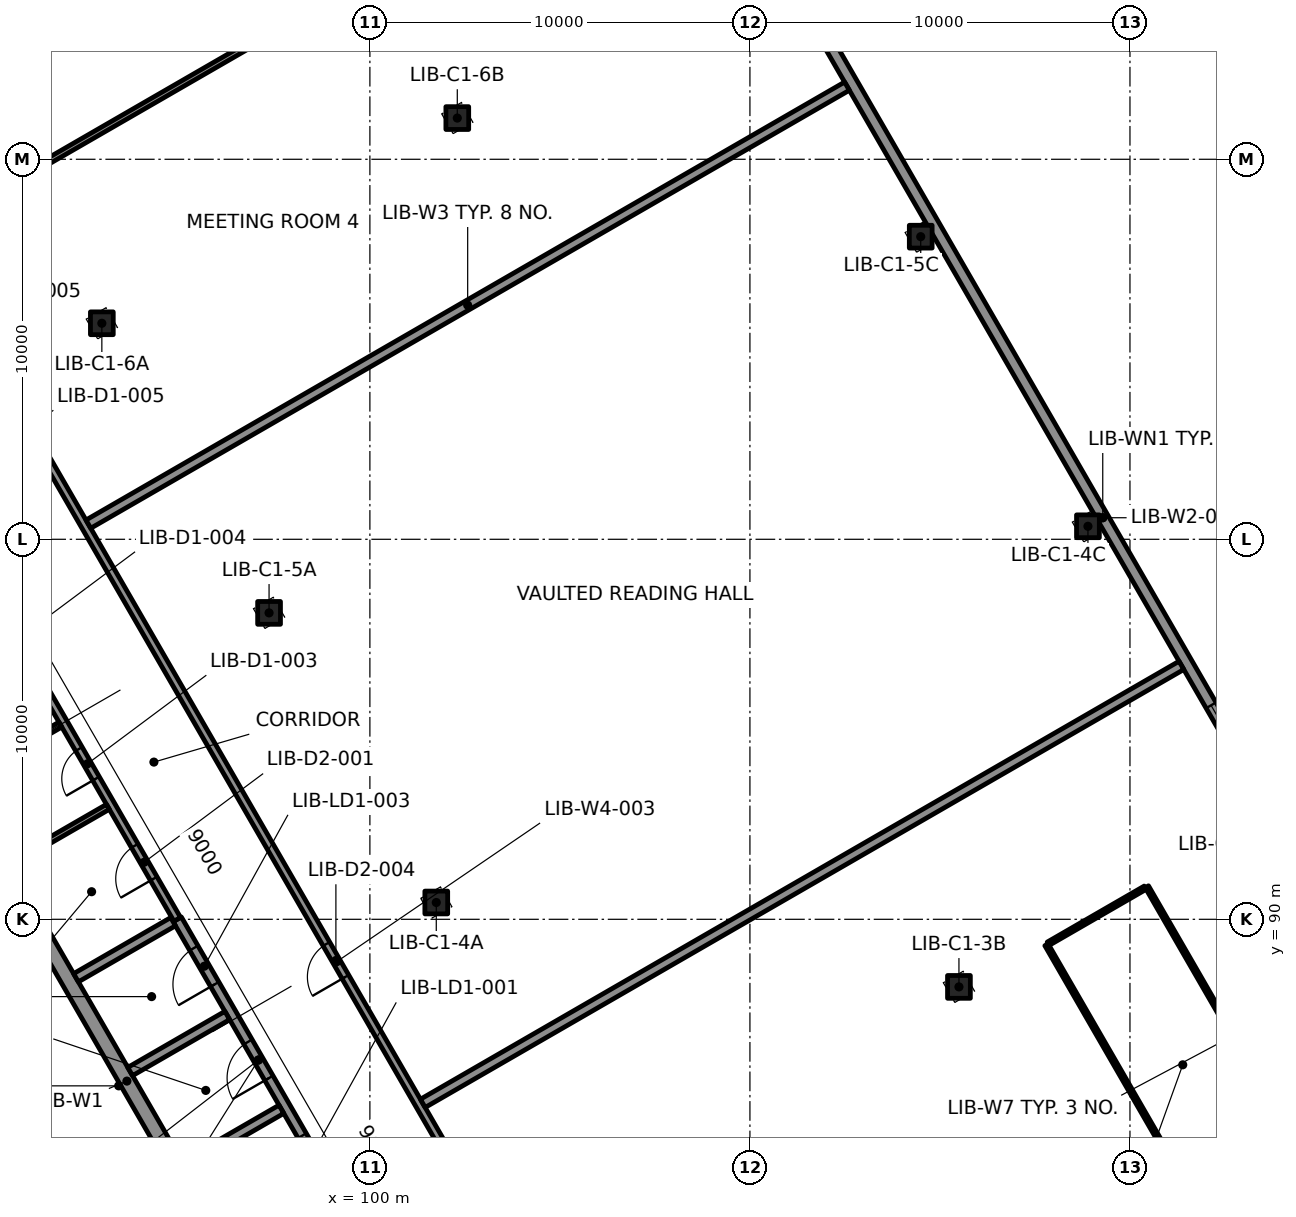
"""IFC4 building model, lengths in metres.
Left out: names, types, materials, properties, quantities, classifications, styles, units other than length and angle.
Written with IfcOpenShell. Run it as: python <this file> out.ifc"""

import sys

from ifc_helpers import new_model, si_unit, direction, frame, frame_2d, origin, origin_2d, place, context, subcontext, project, spatial, rectangle, extrude, element, fill, save


model = new_model("IFC4")
c1 = context("Model", 3, precision=1e-05, world=origin(), true_north=direction((0.0, 1.0)))
c2 = subcontext(c1, "Body", "Model", "MODEL_VIEW")
j1 = project(units=[si_unit("LENGTHUNIT", "METRE"), si_unit("PLANEANGLEUNIT", "RADIAN")], contexts=[c1])
p1 = place(None, origin())
s1 = spatial("IfcSite", under=j1, at=p1, CompositionType="ELEMENT")
p2 = place(p1, origin())
s2 = spatial("IfcBuilding", under=s1, at=p2, CompositionType="ELEMENT")
p3 = place(p2, frame((0.0, 0.0, 21.8)))
s3 = spatial("IfcBuildingStorey", under=s2, at=p3, CompositionType="ELEMENT", Elevation=21.8)
p4 = place(p3, frame((92.22, 84.942, -0.0), z_axis=(0.0, 0.0, 1.0), x_axis=(-0.5, 0.866025403784, 0.0)))
e1 = element("IfcColumn", 1, at=p4, inside=s3, PredefinedType="COLUMN", context=c2, shape_type="SweptSolid", body=[
    extrude(rectangle(XDim=1.2, YDim=1.5, at=origin_2d()), origin(), (0.0, 0.0, 1.0), 4.6),
])
for number, where, z_axis, x_axis in (
    (2, (115.5, 88.221, -0.36), (0.0, 0.0, 1.0), (1.0, 0.0, 0.0)),
    (3, (101.747, 90.442, -0.36), (0.0, 0.0, 1.0), (1.0, 0.0, 0.0)),
    (4, (118.894, 100.342, -0.36), (0.0, 0.0, 1.0), (1.0, 0.0, 0.0)),
    (5, (97.347, 98.063, -0.36), (0.0, 0.0, 1.0), (1.0, 0.0, 0.0)),
    (6, (114.494, 107.963, -0.36), (0.0, 0.0, 1.0), (1.0, 0.0, 0.0)),
    (7, (92.947, 105.684, -0.36), (0.0, 0.0, 1.0), (1.0, 0.0, 0.0)),
    (8, (102.3, 111.084, -0.36), (0.0, 0.0, 1.0), (1.0, 0.0, 0.0)),
):
    element("IfcColumn", number, at=place(p3, frame(where, z_axis=z_axis, x_axis=x_axis)), inside=s3, PredefinedType="COLUMN", context=c2, shape_type="SweptSolid", body=[
        extrude(rectangle(XDim=0.6, YDim=0.6, at=origin_2d()), origin(), (0.0, 0.0, 1.0), 4.66),
    ])
p5 = place(p3, frame((107.106, 62.36, 0.0), z_axis=(0.0, 0.0, 1.0), x_axis=(-0.49999992739, 0.866025445706, 0.0)))
e9 = element("IfcWall", 9, at=p5, inside=s3, PredefinedType="SOLIDWALL", context=c2, shape_type="SweptSolid", body=[
    extrude(rectangle(XDim=54.0, YDim=0.4, at=frame_2d((27.0, 0.0))), origin(), (0.0, 0.0, 1.0), 4.3),
])
p6 = place(p3, frame((132.784, 77.185, 0.0), z_axis=(0.0, 0.0, 1.0), x_axis=(-0.49999992739, 0.866025445706, 0.0)))
e10 = element("IfcWall", 10, at=p6, inside=s3, PredefinedType="SOLIDWALL", context=c2, shape_type="SweptSolid", body=[
    extrude(rectangle(XDim=54.0, YDim=0.3, at=frame_2d((27.0, 0.0))), origin(), (0.0, 0.0, 1.0), 4.3),
])
p7 = place(p6, frame((1.9, 0.0, 0.9)))
e11 = element("IfcOpeningElement", 11, at=p7, cuts=e10, PredefinedType="OPENING", context=c2, shape_type="SweptSolid", body=[
    extrude(rectangle(XDim=1.8, YDim=2.4, at=frame_2d((0.9, 1.2))), frame((0.0, 0.16, 0.0), z_axis=(0.0, -1.0, 0.0), x_axis=(1.0, 0.0, 0.0)), (0.0, 0.0, 1.0), 0.32),
])
p8 = place(p6, frame((6.3, 0.0, 0.9)))
e12 = element("IfcOpeningElement", 12, at=p8, cuts=e10, PredefinedType="OPENING", context=c2, shape_type="SweptSolid", body=[
    extrude(rectangle(XDim=1.8, YDim=2.4, at=frame_2d((0.9, 1.2))), frame((0.0, 0.16, 0.0), z_axis=(0.0, -1.0, 0.0), x_axis=(1.0, 0.0, 0.0)), (0.0, 0.0, 1.0), 0.32),
])
p9 = place(p6, frame((10.7, 0.0, 0.9)))
e13 = element("IfcOpeningElement", 13, at=p9, cuts=e10, PredefinedType="OPENING", context=c2, shape_type="SweptSolid", body=[
    extrude(rectangle(XDim=1.8, YDim=2.4, at=frame_2d((0.9, 1.2))), frame((0.0, 0.16, 0.0), z_axis=(0.0, -1.0, 0.0), x_axis=(1.0, 0.0, 0.0)), (0.0, 0.0, 1.0), 0.32),
])
p10 = place(p6, frame((15.1, 0.0, 0.9)))
e14 = element("IfcOpeningElement", 14, at=p10, cuts=e10, PredefinedType="OPENING", context=c2, shape_type="SweptSolid", body=[
    extrude(rectangle(XDim=1.8, YDim=2.4, at=frame_2d((0.9, 1.2))), frame((0.0, 0.16, 0.0), z_axis=(0.0, -1.0, 0.0), x_axis=(1.0, 0.0, 0.0)), (0.0, 0.0, 1.0), 0.32),
])
p11 = place(p6, frame((19.5, 0.0, 0.9)))
e15 = element("IfcOpeningElement", 15, at=p11, cuts=e10, PredefinedType="OPENING", context=c2, shape_type="SweptSolid", body=[
    extrude(rectangle(XDim=1.8, YDim=2.4, at=frame_2d((0.9, 1.2))), frame((0.0, 0.16, 0.0), z_axis=(0.0, -1.0, 0.0), x_axis=(1.0, 0.0, 0.0)), (0.0, 0.0, 1.0), 0.32),
])
p12 = place(p6, frame((41.5, 0.0, 0.9)))
e16 = element("IfcOpeningElement", 16, at=p12, cuts=e10, PredefinedType="OPENING", context=c2, shape_type="SweptSolid", body=[
    extrude(rectangle(XDim=1.8, YDim=2.4, at=frame_2d((0.9, 1.2))), frame((0.0, 0.16, 0.0), z_axis=(0.0, -1.0, 0.0), x_axis=(1.0, 0.0, 0.0)), (0.0, 0.0, 1.0), 0.32),
])
p13 = place(p6, frame((45.9, 0.0, 0.9)))
e17 = element("IfcOpeningElement", 17, at=p13, cuts=e10, PredefinedType="OPENING", context=c2, shape_type="SweptSolid", body=[
    extrude(rectangle(XDim=1.8, YDim=2.4, at=frame_2d((0.9, 1.2))), frame((0.0, 0.16, 0.0), z_axis=(0.0, -1.0, 0.0), x_axis=(1.0, 0.0, 0.0)), (0.0, 0.0, 1.0), 0.32),
])
p14 = place(p6, frame((50.3, 0.0, 0.9)))
e18 = element("IfcOpeningElement", 18, at=p14, cuts=e10, PredefinedType="OPENING", context=c2, shape_type="SweptSolid", body=[
    extrude(rectangle(XDim=1.8, YDim=2.4, at=frame_2d((0.9, 1.2))), frame((0.0, 0.16, 0.0), z_axis=(0.0, -1.0, 0.0), x_axis=(1.0, 0.0, 0.0)), (0.0, 0.0, 1.0), 0.32),
])
p15 = place(p3, frame((80.354, 109.095, 0.0), z_axis=(0.0, 0.0, 1.0), x_axis=(0.866026568746, 0.499997982221, 0.0)))
e19 = element("IfcWall", 19, at=p15, inside=s3, PredefinedType="SOLIDWALL", context=c2, shape_type="SweptSolid", body=[
    extrude(rectangle(XDim=29.3, YDim=0.3, at=frame_2d((14.65, 0.0))), origin(), (0.0, 0.0, 1.0), 4.3),
])
p16 = place(p3, frame((99.205, 82.595, 0.0), z_axis=(0.0, 0.0, 1.0), x_axis=(-0.500011643316, 0.866018681408, 0.0)))
e20 = element("IfcWall", 20, at=p16, inside=s3, PredefinedType="SOLIDWALL", context=c2, shape_type="SweptSolid", body=[
    extrude(rectangle(XDim=8.55, YDim=0.25, at=frame_2d((4.275, 0.0))), origin(), (0.0, 0.0, 1.0), 4.3),
])
p17 = place(p16, frame((0.875, 0.0, 0.0)))
e21 = element("IfcOpeningElement", 21, at=p17, cuts=e20, PredefinedType="OPENING", context=c2, shape_type="SweptSolid", body=[
    extrude(rectangle(XDim=1.1, YDim=2.1, at=frame_2d((0.55, 1.05))), frame((0.0, 0.135, 0.0), z_axis=(0.0, -1.0, 0.0), x_axis=(1.0, 0.0, 0.0)), (0.0, 0.0, 1.0), 0.27),
])
p18 = place(p16, frame((3.725, 0.0, 0.0)))
e22 = element("IfcOpeningElement", 22, at=p18, cuts=e20, PredefinedType="OPENING", context=c2, shape_type="SweptSolid", body=[
    extrude(rectangle(XDim=1.1, YDim=2.1, at=frame_2d((0.55, 1.05))), frame((0.0, 0.135, 0.0), z_axis=(0.0, -1.0, 0.0), x_axis=(1.0, 0.0, 0.0)), (0.0, 0.0, 1.0), 0.27),
])
p19 = place(p16, frame((6.575, 0.0, 0.0)))
e23 = element("IfcOpeningElement", 23, at=p19, cuts=e20, PredefinedType="OPENING", context=c2, shape_type="SweptSolid", body=[
    extrude(rectangle(XDim=1.1, YDim=2.1, at=frame_2d((0.55, 1.05))), frame((0.0, 0.135, 0.0), z_axis=(0.0, -1.0, 0.0), x_axis=(1.0, 0.0, 0.0)), (0.0, 0.0, 1.0), 0.27),
])
p20 = place(p3, frame((94.93, 90.0, 0.0), z_axis=(0.0, 0.0, 1.0), x_axis=(-0.499997667785, 0.866026750285, 0.0)))
e24 = element("IfcWall", 24, at=p20, inside=s3, PredefinedType="PARTITIONING", context=c2, shape_type="SweptSolid", body=[
    extrude(rectangle(XDim=14.59, YDim=0.2, at=frame_2d((7.295, 0.0))), origin(), (0.0, 0.0, 1.0), 4.3),
])
p21 = place(p20, frame((1.235, 0.0, 0.0)))
e25 = element("IfcOpeningElement", 25, at=p21, cuts=e24, PredefinedType="OPENING", context=c2, shape_type="SweptSolid", body=[
    extrude(rectangle(XDim=1.0, YDim=2.1, at=frame_2d((0.5, 1.05))), frame((0.0, 0.11, 0.0), z_axis=(0.0, -1.0, 0.0), x_axis=(1.0, 0.0, 0.0)), (0.0, 0.0, 1.0), 0.22),
])
p22 = place(p20, frame((4.275, 0.0, 0.0)))
e26 = element("IfcOpeningElement", 26, at=p22, cuts=e24, PredefinedType="OPENING", context=c2, shape_type="SweptSolid", body=[
    extrude(rectangle(XDim=0.9, YDim=2.1, at=frame_2d((0.45, 1.05))), frame((0.0, 0.11, 0.0), z_axis=(0.0, -1.0, 0.0), x_axis=(1.0, 0.0, 0.0)), (0.0, 0.0, 1.0), 0.22),
])
p23 = place(p20, frame((8.025, 0.0, 0.0)))
e27 = element("IfcOpeningElement", 27, at=p23, cuts=e24, PredefinedType="OPENING", context=c2, shape_type="SweptSolid", body=[
    extrude(rectangle(XDim=0.9, YDim=2.1, at=frame_2d((0.45, 1.05))), frame((0.0, 0.11, 0.0), z_axis=(0.0, -1.0, 0.0), x_axis=(1.0, 0.0, 0.0)), (0.0, 0.0, 1.0), 0.22),
])
p24 = place(p20, frame((12.325, 0.0, 0.0)))
e28 = element("IfcOpeningElement", 28, at=p24, cuts=e24, PredefinedType="OPENING", context=c2, shape_type="SweptSolid", body=[
    extrude(rectangle(XDim=0.9, YDim=2.1, at=frame_2d((0.45, 1.05))), frame((0.0, 0.11, 0.0), z_axis=(0.0, -1.0, 0.0), x_axis=(1.0, 0.0, 0.0)), (0.0, 0.0, 1.0), 0.22),
])
for number, where, z_axis, x_axis in (
    (29, (95.117, 83.526, 0.0), (0.0, 0.0, 1.0), (0.866, 0.5, 0.0)),
    (30, (93.692, 85.994, 0.0), (0.0, 0.0, 1.0), (0.866, 0.5, 0.0)),
):
    element("IfcWall", number, at=place(p3, frame(where, z_axis=z_axis, x_axis=x_axis)), inside=s3, PredefinedType="SOLIDWALL", context=c2, shape_type="SweptSolid", body=[
        extrude(rectangle(XDim=2.95, YDim=0.25, at=frame_2d((1.475, 0.0))), origin(), (0.0, 0.0, 1.0), 4.3),
    ])
p25 = place(p3, frame((92.267, 88.462, 0.0), z_axis=(0.0, 0.0, 1.0), x_axis=(0.866024349092, 0.500001826776, 0.0)))
e31 = element("IfcWall", 31, at=p25, inside=s3, PredefinedType="SOLIDWALL", context=c2, shape_type="SweptSolid", body=[
    extrude(rectangle(XDim=2.95, YDim=0.25, at=frame_2d((1.475, 0.0))), origin(), (0.0, 0.0, 1.0), 4.3),
])
for number, where, z_axis, x_axis in (
    (32, (90.529, 91.471, 0.0), (0.0, 0.0, 1.0), (0.866, 0.5, 0.0)),
    (33, (89.279, 93.636, 0.0), (0.0, 0.0, 1.0), (0.866, 0.5, 0.0)),
):
    element("IfcWall", number, at=place(p3, frame(where, z_axis=z_axis, x_axis=x_axis)), inside=s3, PredefinedType="PARTITIONING", context=c2, shape_type="SweptSolid", body=[
        extrude(rectangle(XDim=2.975, YDim=0.15, at=frame_2d((1.488, 0.0))), origin(), (0.0, 0.0, 1.0), 4.3),
    ])
p26 = place(p3, frame((112.496, 65.725, 0.0), z_axis=(0.0, 0.0, 1.0), x_axis=(-0.499998673217, 0.866026169802, 0.0)))
e34 = element("IfcWall", 34, at=p26, inside=s3, PredefinedType="PARTITIONING", context=c2, shape_type="SweptSolid", body=[
    extrude(rectangle(XDim=53.48, YDim=0.2, at=frame_2d((26.74, 0.0))), origin(), (0.0, 0.0, 1.0), 4.3),
])
p27 = place(p26, frame((13.08, 0.0, 0.0)))
e35 = element("IfcOpeningElement", 35, at=p27, cuts=e34, PredefinedType="OPENING", context=c2, shape_type="SweptSolid", body=[
    extrude(rectangle(XDim=1.0, YDim=2.1, at=frame_2d((0.5, 1.05))), frame((0.0, 0.11, 0.0), z_axis=(0.0, -1.0, 0.0), x_axis=(1.0, 0.0, 0.0)), (0.0, 0.0, 1.0), 0.22),
])
p28 = place(p26, frame((26.28, 0.0, 0.0)))
e36 = element("IfcOpeningElement", 36, at=p28, cuts=e34, PredefinedType="OPENING", context=c2, shape_type="SweptSolid", body=[
    extrude(rectangle(XDim=1.0, YDim=2.1, at=frame_2d((0.5, 1.05))), frame((0.0, 0.11, 0.0), z_axis=(0.0, -1.0, 0.0), x_axis=(1.0, 0.0, 0.0)), (0.0, 0.0, 1.0), 0.22),
])
p29 = place(p26, frame((43.88, 0.0, 0.0)))
e37 = element("IfcOpeningElement", 37, at=p29, cuts=e34, PredefinedType="OPENING", context=c2, shape_type="SweptSolid", body=[
    extrude(rectangle(XDim=1.0, YDim=2.1, at=frame_2d((0.5, 1.05))), frame((0.0, 0.11, 0.0), z_axis=(0.0, -1.0, 0.0), x_axis=(1.0, 0.0, 0.0)), (0.0, 0.0, 1.0), 0.22),
])
p30 = place(p26, frame((50.58, 0.0, 0.0)))
e38 = element("IfcOpeningElement", 38, at=p30, cuts=e34, PredefinedType="OPENING", context=c2, shape_type="SweptSolid", body=[
    extrude(rectangle(XDim=1.0, YDim=2.1, at=frame_2d((0.5, 1.05))), frame((0.0, 0.11, 0.0), z_axis=(0.0, -1.0, 0.0), x_axis=(1.0, 0.0, 0.0)), (0.0, 0.0, 1.0), 0.22),
])
p31 = place(p3, frame((101.392, 85.157, 0.0), z_axis=(0.0, 0.0, 1.0), x_axis=(0.866022961126, 0.500004230785, 0.0)))
e39 = element("IfcWall", 39, at=p31, inside=s3, PredefinedType="SOLIDWALL", context=c2, shape_type="SweptSolid", body=[
    extrude(rectangle(XDim=23.05, YDim=0.25, at=frame_2d((11.525, 0.0))), origin(), (0.0, 0.0, 1.0), 4.3),
])
for number, where, z_axis, x_axis in (
    (40, (122.333, 81.486, 0.0), (0.0, 0.0, 1.0), (-0.5, 0.866, 0.0)),
    (41, (124.975, 83.01, 0.0), (0.0, 0.0, 1.0), (-0.5, 0.866, 0.0)),
):
    element("IfcWall", number, at=place(p3, frame(where, z_axis=z_axis, x_axis=x_axis)), inside=s3, PredefinedType="PARTITIONING", context=c2, shape_type="SweptSolid", body=[
        extrude(rectangle(XDim=9.06, YDim=0.1, at=frame_2d((4.53, 0.0))), origin(), (0.0, 0.0, 1.0), 4.3),
    ])
p32 = place(p3, frame((117.847, 89.357, 0.0), z_axis=(0.0, 0.0, 1.0), x_axis=(0.866003658127, 0.500037662692, 0.0)))
e42 = element("IfcWall", 42, at=p32, inside=s3, PredefinedType="PARTITIONING", context=c2, shape_type="SweptSolid", body=[
    extrude(rectangle(XDim=2.95, YDim=0.1, at=frame_2d((1.475, 0.0))), origin(), (0.0, 0.0, 1.0), 4.3),
])
p33 = place(p3, frame((92.592, 100.399, 0.0), z_axis=(0.0, 0.0, 1.0), x_axis=(0.866022961126, 0.500004230785, 0.0)))
e43 = element("IfcWall", 43, at=p33, inside=s3, PredefinedType="SOLIDWALL", context=c2, shape_type="SweptSolid", body=[
    extrude(rectangle(XDim=23.05, YDim=0.25, at=frame_2d((11.525, 0.0))), origin(), (0.0, 0.0, 1.0), 4.3),
])
p34 = place(p3, frame((88.192, 108.02, 0.0), z_axis=(0.0, 0.0, 1.0), x_axis=(0.866027547497, 0.499996286962, 0.0)))
e44 = element("IfcWall", 44, at=p34, inside=s3, PredefinedType="PARTITIONING", context=c2, shape_type="SweptSolid", body=[
    extrude(rectangle(XDim=23.05, YDim=0.15, at=frame_2d((11.525, 0.0))), origin(), (0.0, 0.0, 1.0), 4.3),
])
p35 = place(p11, origin())
e45 = element("IfcWindow", 45, at=p35, inside=s3, PartitioningType="SINGLE_PANEL", PredefinedType="WINDOW", context=c2, shape_type="SweptSolid", body=[
    extrude(rectangle(XDim=1.8, YDim=2.4, at=frame_2d((0.9, 1.2))), frame((0.0, 0.03, 0.0), z_axis=(0.0, -1.0, 0.0), x_axis=(1.0, 0.0, 0.0)), (0.0, 0.0, 1.0), 0.06),
])
fill(e15, e45)
p36 = place(p21, origin())
e46 = element("IfcDoor", 46, at=p36, inside=s3, OperationType="SINGLE_SWING_LEFT", PredefinedType="DOOR", context=c2, shape_type="SweptSolid", body=[
    extrude(rectangle(XDim=1.0, YDim=2.1, at=frame_2d((0.5, 1.05))), frame((0.0, 0.025, 0.0), z_axis=(0.0, -1.0, 0.0), x_axis=(1.0, 0.0, 0.0)), (0.0, 0.0, 1.0), 0.05),
])
fill(e25, e46)
p37 = place(p22, origin())
e47 = element("IfcDoor", 47, at=p37, inside=s3, OperationType="SINGLE_SWING_RIGHT", PredefinedType="DOOR", context=c2, shape_type="SweptSolid", body=[
    extrude(rectangle(XDim=0.9, YDim=2.1, at=frame_2d((0.45, 1.05))), frame((0.0, 0.025, 0.0), z_axis=(0.0, -1.0, 0.0), x_axis=(1.0, 0.0, 0.0)), (0.0, 0.0, 1.0), 0.05),
])
fill(e26, e47)
p38 = place(p17, origin())
e48 = element("IfcDoor", 48, at=p38, inside=s3, OperationType="DOUBLE_DOOR_SLIDING", PredefinedType="DOOR", context=c2, shape_type="SweptSolid", body=[
    extrude(rectangle(XDim=1.1, YDim=2.1, at=frame_2d((0.55, 1.05))), frame((0.0, 0.025, 0.0), z_axis=(0.0, -1.0, 0.0), x_axis=(1.0, 0.0, 0.0)), (0.0, 0.0, 1.0), 0.05),
])
fill(e21, e48)
p39 = place(p18, origin())
e49 = element("IfcDoor", 49, at=p39, inside=s3, OperationType="DOUBLE_DOOR_SLIDING", PredefinedType="DOOR", context=c2, shape_type="SweptSolid", body=[
    extrude(rectangle(XDim=1.1, YDim=2.1, at=frame_2d((0.55, 1.05))), frame((0.0, 0.025, 0.0), z_axis=(0.0, -1.0, 0.0), x_axis=(1.0, 0.0, 0.0)), (0.0, 0.0, 1.0), 0.05),
])
fill(e22, e49)
p40 = place(p19, origin())
e50 = element("IfcDoor", 50, at=p40, inside=s3, OperationType="DOUBLE_DOOR_SLIDING", PredefinedType="DOOR", context=c2, shape_type="SweptSolid", body=[
    extrude(rectangle(XDim=1.1, YDim=2.1, at=frame_2d((0.55, 1.05))), frame((0.0, 0.025, 0.0), z_axis=(0.0, -1.0, 0.0), x_axis=(1.0, 0.0, 0.0)), (0.0, 0.0, 1.0), 0.05),
])
fill(e23, e50)
p41 = place(p28, origin())
e51 = element("IfcDoor", 51, at=p41, inside=s3, OperationType="SINGLE_SWING_RIGHT", PredefinedType="DOOR", context=c2, shape_type="SweptSolid", body=[
    extrude(rectangle(XDim=1.0, YDim=2.1, at=frame_2d((0.5, 1.05))), frame((0.0, 0.025, 0.0), z_axis=(0.0, -1.0, 0.0), x_axis=(1.0, 0.0, 0.0)), (0.0, 0.0, 1.0), 0.05),
])
fill(e36, e51)
save(model, sys.argv[1])
